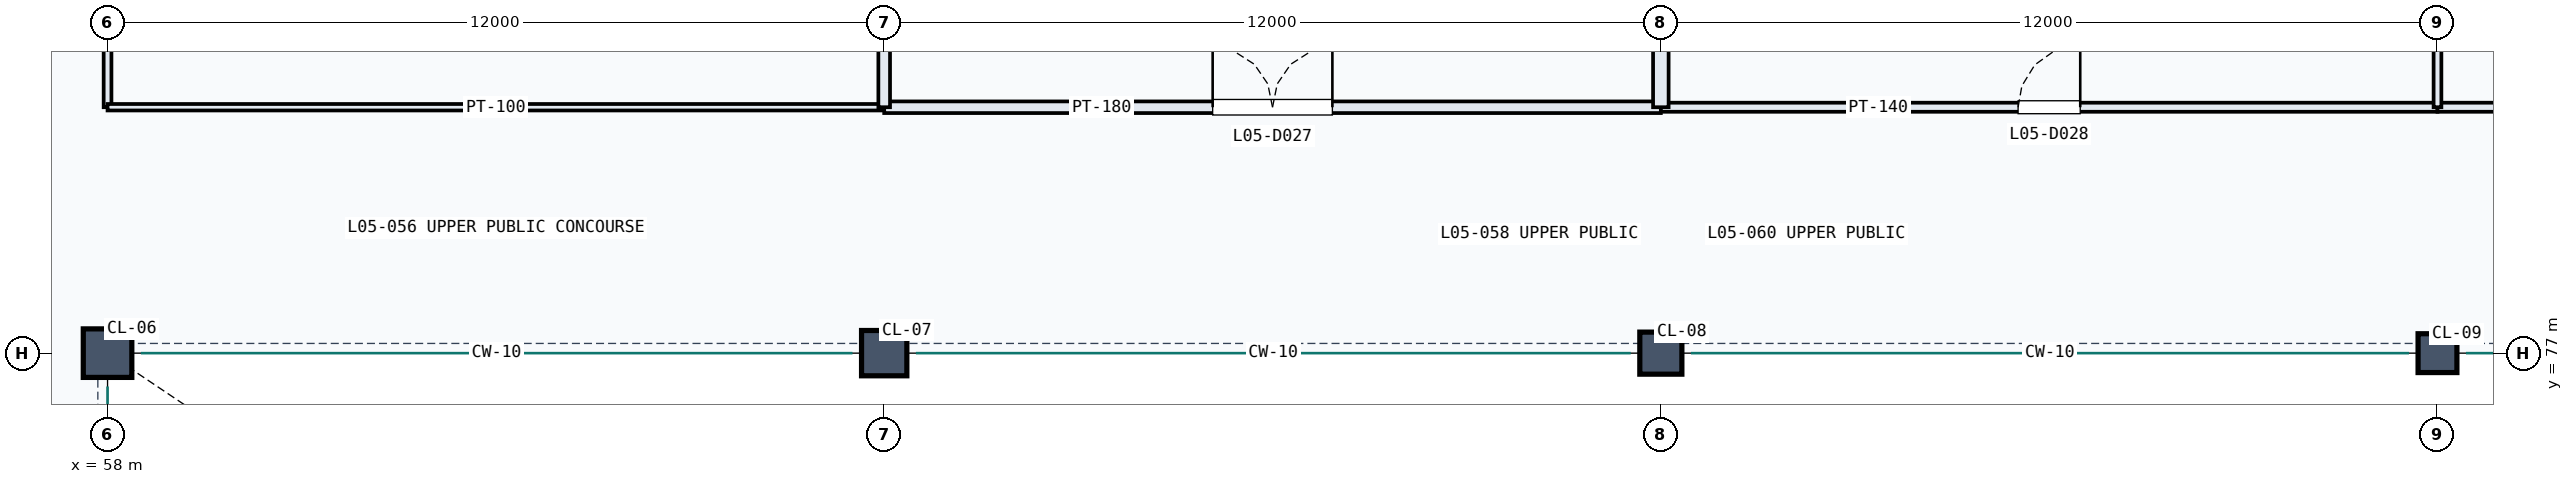
"""IFC4 building model, lengths in metres.
Left out: names, types, materials, properties, quantities, classifications, styles, units other than length and angle.
Written with IfcOpenShell. Run it as: python <this file> out.ifc"""

import sys

from ifc_helpers import new_model, si_unit, direction, frame, frame_2d, origin, origin_2d, place, context, subcontext, project, spatial, rectangle, extrude, element, fill, save


model = new_model("IFC4")
c1 = context("Model", 3, precision=1e-05, world=origin(), true_north=direction((0.0, 1.0)))
c2 = subcontext(c1, "Body", "Model", "MODEL_VIEW")
j1 = project(units=[si_unit("LENGTHUNIT", "METRE"), si_unit("PLANEANGLEUNIT", "RADIAN")], contexts=[c1])
p1 = place(None, origin())
s1 = spatial("IfcSite", under=j1, at=p1, CompositionType="ELEMENT")
p2 = place(p1, origin())
s2 = spatial("IfcBuilding", under=s1, at=p2, CompositionType="ELEMENT")
p3 = place(p2, frame((0.0, 0.0, 24.3)))
s3 = spatial("IfcBuildingStorey", under=s2, at=p3, CompositionType="ELEMENT", Elevation=24.3)
p4 = place(p3, frame((58.0, 77.0, 0.0), z_axis=(0.0, 0.0, 1.0), x_axis=(1.0, 0.0, 0.0)))
e1 = element("IfcColumn", 1, at=p4, inside=s3, PredefinedType="COLUMN", context=c2, shape_type="SweptSolid", body=[
    extrude(rectangle(XDim=0.75, YDim=0.75, at=origin_2d()), origin(), (0.0, 0.0, 1.0), 5.4),
])
p5 = place(p3, frame((70.0, 77.0, 0.0), z_axis=(0.0, 0.0, 1.0), x_axis=(1.0, 0.0, 0.0)))
e2 = element("IfcColumn", 2, at=p5, inside=s3, PredefinedType="COLUMN", context=c2, shape_type="SweptSolid", body=[
    extrude(rectangle(XDim=0.7, YDim=0.7, at=origin_2d()), origin(), (0.0, 0.0, 1.0), 5.4),
])
p6 = place(p3, frame((82.0, 77.0, 0.0), z_axis=(0.0, 0.0, 1.0), x_axis=(1.0, 0.0, 0.0)))
e3 = element("IfcColumn", 3, at=p6, inside=s3, PredefinedType="COLUMN", context=c2, shape_type="SweptSolid", body=[
    extrude(rectangle(XDim=0.65, YDim=0.65, at=origin_2d()), origin(), (0.0, 0.0, 1.0), 5.4),
])
p7 = place(p3, frame((94.0, 77.0, 0.0), z_axis=(0.0, 0.0, 1.0), x_axis=(1.0, 0.0, 0.0)))
e4 = element("IfcColumn", 4, at=p7, inside=s3, PredefinedType="COLUMN", context=c2, shape_type="SweptSolid", body=[
    extrude(rectangle(XDim=0.6, YDim=0.6, at=origin_2d()), origin(), (0.0, 0.0, 1.0), 5.4),
])
p8 = place(p3, frame((58.0, 80.8, 0.0), z_axis=(0.0, 0.0, 1.0), x_axis=(0.0, 1.0, 0.0)))
e5 = element("IfcWall", 5, at=p8, inside=s3, PredefinedType="PARTITIONING", context=c2, shape_type="SweptSolid", body=[
    extrude(rectangle(XDim=6.98, YDim=0.12, at=frame_2d((3.49, 0.0))), origin(), (0.0, 0.0, 1.0), 5.18),
])
p9 = place(p8, frame((2.94, 0.0, 0.0)))
e6 = element("IfcOpeningElement", 6, at=p9, cuts=e5, PredefinedType="OPENING", context=c2, shape_type="SweptSolid", body=[
    extrude(rectangle(XDim=1.1, YDim=2.1, at=frame_2d((0.55, 1.05))), frame((0.0, 0.07, 0.0), z_axis=(0.0, -1.0, 0.0), x_axis=(1.0, 0.0, 0.0)), (0.0, 0.0, 1.0), 0.14),
])
p10 = place(p3, frame((58.0, 80.8, 0.0), z_axis=(0.0, 0.0, 1.0), x_axis=(1.0, 0.0, 0.0)))
e7 = element("IfcWall", 7, at=p10, inside=s3, PredefinedType="PARTITIONING", context=c2, shape_type="SweptSolid", body=[
    extrude(rectangle(XDim=12.0, YDim=0.1, at=frame_2d((6.0, 0.0))), origin(), (0.0, 0.0, 1.0), 5.18),
])
p11 = place(p3, frame((70.0, 80.8, 0.0), z_axis=(0.0, 0.0, 1.0), x_axis=(1.0, 0.0, 0.0)))
e8 = element("IfcWall", 8, at=p11, inside=s3, PredefinedType="PARTITIONING", context=c2, shape_type="SweptSolid", body=[
    extrude(rectangle(XDim=12.0, YDim=0.18, at=frame_2d((6.0, 0.0))), origin(), (0.0, 0.0, 1.0), 5.18),
])
p12 = place(p11, frame((5.075, 0.0, 0.0)))
e9 = element("IfcOpeningElement", 9, at=p12, cuts=e8, PredefinedType="OPENING", context=c2, shape_type="SweptSolid", body=[
    extrude(rectangle(XDim=1.85, YDim=2.35, at=frame_2d((0.925, 1.175))), frame((0.0, 0.1, 0.0), z_axis=(0.0, -1.0, 0.0), x_axis=(1.0, 0.0, 0.0)), (0.0, 0.0, 1.0), 0.2),
])
p13 = place(p3, frame((82.0, 80.8, 0.0), z_axis=(0.0, 0.0, 1.0), x_axis=(1.0, 0.0, 0.0)))
e10 = element("IfcWall", 10, at=p13, inside=s3, PredefinedType="PARTITIONING", context=c2, shape_type="SweptSolid", body=[
    extrude(rectangle(XDim=12.0, YDim=0.14, at=frame_2d((6.0, 0.0))), origin(), (0.0, 0.0, 1.0), 5.18),
])
p14 = place(p13, frame((5.52, 0.0, 0.0)))
e11 = element("IfcOpeningElement", 11, at=p14, cuts=e10, PredefinedType="OPENING", context=c2, shape_type="SweptSolid", body=[
    extrude(rectangle(XDim=0.96, YDim=2.15, at=frame_2d((0.48, 1.075))), frame((0.0, 0.08, 0.0), z_axis=(0.0, -1.0, 0.0), x_axis=(1.0, 0.0, 0.0)), (0.0, 0.0, 1.0), 0.16),
])
p15 = place(p3, frame((94.0, 80.8, 0.0), z_axis=(0.0, 0.0, 1.0), x_axis=(1.0, 0.0, 0.0)))
e12 = element("IfcWall", 12, at=p15, inside=s3, PredefinedType="PARTITIONING", context=c2, shape_type="SweptSolid", body=[
    extrude(rectangle(XDim=10.0, YDim=0.14, at=frame_2d((5.0, 0.0))), origin(), (0.0, 0.0, 1.0), 5.18),
])
p16 = place(p15, frame((4.19, 0.0, 0.0)))
e13 = element("IfcOpeningElement", 13, at=p16, cuts=e12, PredefinedType="OPENING", context=c2, shape_type="SweptSolid", body=[
    extrude(rectangle(XDim=1.62, YDim=2.25, at=frame_2d((0.81, 1.125))), frame((0.0, 0.08, 0.0), z_axis=(0.0, -1.0, 0.0), x_axis=(1.0, 0.0, 0.0)), (0.0, 0.0, 1.0), 0.16),
])
p17 = place(p3, frame((70.0, 80.8, 0.0), z_axis=(0.0, 0.0, 1.0), x_axis=(0.0, 1.0, 0.0)))
e14 = element("IfcWall", 14, at=p17, inside=s3, PredefinedType="PARTITIONING", context=c2, shape_type="SweptSolid", body=[
    extrude(rectangle(XDim=14.488, YDim=0.18, at=frame_2d((7.244, 0.0))), origin(), (0.0, 0.0, 1.0), 5.18),
])
p18 = place(p3, frame((82.0, 80.8, 0.0), z_axis=(0.0, 0.0, 1.0), x_axis=(0.0, 1.0, 0.0)))
e15 = element("IfcWall", 15, at=p18, inside=s3, PredefinedType="PARTITIONING", context=c2, shape_type="SweptSolid", body=[
    extrude(rectangle(XDim=15.184, YDim=0.24, at=frame_2d((7.592, 0.0))), origin(), (0.0, 0.0, 1.0), 5.18),
])
p19 = place(p3, frame((94.0, 80.8, 0.0), z_axis=(0.0, 0.0, 1.0), x_axis=(0.0, 1.0, 0.0)))
e16 = element("IfcWall", 16, at=p19, inside=s3, PredefinedType="PARTITIONING", context=c2, shape_type="SweptSolid", body=[
    extrude(rectangle(XDim=14.015, YDim=0.12, at=frame_2d((7.008, 0.0))), origin(), (0.0, 0.0, 1.0), 5.18),
])
p20 = place(p12, origin())
e17 = element("IfcDoor", 17, at=p20, inside=s3, OperationType="DOUBLE_DOOR_SINGLE_SWING", PredefinedType="DOOR", context=c2, shape_type="SweptSolid", body=[
    extrude(rectangle(XDim=1.85, YDim=2.35, at=frame_2d((0.925, 1.175))), frame((0.0, 0.025, 0.0), z_axis=(0.0, -1.0, 0.0), x_axis=(1.0, 0.0, 0.0)), (0.0, 0.0, 1.0), 0.05),
])
fill(e9, e17)
p21 = place(p14, origin())
e18 = element("IfcDoor", 18, at=p21, inside=s3, OperationType="SINGLE_SWING_RIGHT", PredefinedType="DOOR", context=c2, shape_type="SweptSolid", body=[
    extrude(rectangle(XDim=0.96, YDim=2.15, at=frame_2d((0.48, 1.075))), frame((0.0, 0.025, 0.0), z_axis=(0.0, -1.0, 0.0), x_axis=(1.0, 0.0, 0.0)), (0.0, 0.0, 1.0), 0.05),
])
fill(e11, e18)
save(model, sys.argv[1])
